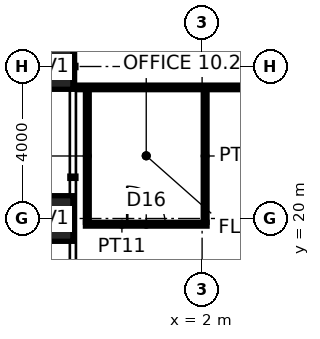
"""IFC4 building model, lengths in metres.
Left out: names, types, materials, properties, quantities, classifications, styles, units other than length and angle.
Written with IfcOpenShell. Run it as: python <this file> out.ifc"""

import sys

from ifc_helpers import new_model, si_unit, direction, frame, frame_2d, origin, origin_2d, place, context, subcontext, project, spatial, rectangle, hollow_rectangle, extrude, element, fill, save


model = new_model("IFC4")
c1 = context("Model", 3, precision=1e-05, world=origin(), true_north=direction((0.0, 1.0)))
c2 = subcontext(c1, "Body", "Model", "MODEL_VIEW")
j1 = project(units=[si_unit("LENGTHUNIT", "METRE"), si_unit("PLANEANGLEUNIT", "RADIAN")], contexts=[c1])
p1 = place(None, origin())
s1 = spatial("IfcSite", under=j1, at=p1, CompositionType="ELEMENT")
p2 = place(p1, origin())
s2 = spatial("IfcBuilding", under=s1, at=p2, CompositionType="ELEMENT")
p3 = place(p2, frame((0.0, 0.0, 43.0)))
s3 = spatial("IfcBuildingStorey", under=s2, at=p3, CompositionType="ELEMENT", Elevation=43.0)
for number, where, z_axis, x_axis in (
    (1, (-2.0, 20.0, 0.0), (0.0, 0.0, 1.0), (1.0, 0.0, 0.0)),
    (2, (-2.0, 24.0, 0.0), (0.0, 0.0, 1.0), (1.0, 0.0, 0.0)),
):
    element("IfcColumn", number, at=place(p3, frame(where, z_axis=z_axis, x_axis=x_axis)), inside=s3, PredefinedType="USERDEFINED", context=c2, shape_type="SweptSolid", body=[
        extrude(hollow_rectangle(XDim=1.2, YDim=1.2, WallThickness=0.1, at=origin_2d()), origin(), (0.0, 0.0, 1.0), 4.0),
    ])
p4 = place(p3, frame((-1.32, 23.45, 0.0), z_axis=(0.0, 0.0, 1.0), x_axis=(1.0, 0.0, 0.0)))
e3 = element("IfcWall", 3, at=p4, inside=s3, PredefinedType="PARTITIONING", context=c2, shape_type="SweptSolid", body=[
    extrude(rectangle(XDim=17.02, YDim=0.12, at=frame_2d((8.51, 0.0))), origin(), (0.0, 0.0, 1.0), 2.65),
])
p5 = place(p3, frame((-1.07, 19.85, 0.0), z_axis=(0.0, 0.0, 1.0), x_axis=(1.0, 0.0, 0.0)))
e4 = element("IfcWall", 4, at=p5, inside=s3, PredefinedType="PARTITIONING", context=c2, shape_type="SweptSolid", body=[
    extrude(rectangle(XDim=3.2, YDim=0.1, at=frame_2d((1.6, 0.0))), origin(), (0.0, 0.0, 1.0), 2.85),
])
p6 = place(p5, frame((1.1, 0.0, 0.0)))
e5 = element("IfcOpeningElement", 5, at=p6, cuts=e4, PredefinedType="OPENING", context=c2, shape_type="SweptSolid", body=[
    extrude(rectangle(XDim=1.0, YDim=2.2, at=frame_2d((0.5, 1.1))), frame((0.0, 0.06, 0.0), z_axis=(0.0, -1.0, 0.0), x_axis=(1.0, 0.0, 0.0)), (0.0, 0.0, 1.0), 0.12),
])
for number, where, z_axis, x_axis in (
    (6, (-1.02, 19.9, 0.0), (0.0, 0.0, 1.0), (0.0, 1.0, 0.0)),
    (7, (2.08, 19.9, 0.0), (0.0, 0.0, 1.0), (0.0, 1.0, 0.0)),
):
    element("IfcWall", number, at=place(p3, frame(where, z_axis=z_axis, x_axis=x_axis)), inside=s3, PredefinedType="PARTITIONING", context=c2, shape_type="SweptSolid", body=[
        extrude(rectangle(XDim=3.49, YDim=0.1, at=frame_2d((1.745, 0.0))), origin(), (0.0, 0.0, 1.0), 3.85),
    ])
p7 = place(p6, origin())
e8 = element("IfcDoor", 8, at=p7, inside=s3, OperationType="SINGLE_SWING_LEFT", PredefinedType="DOOR", context=c2, shape_type="SweptSolid", body=[
    extrude(rectangle(XDim=1.0, YDim=2.2, at=frame_2d((0.5, 1.1))), frame((0.0, 0.025, 0.0), z_axis=(0.0, -1.0, 0.0), x_axis=(1.0, 0.0, 0.0)), (0.0, 0.0, 1.0), 0.05),
])
fill(e5, e8)
save(model, sys.argv[1])
